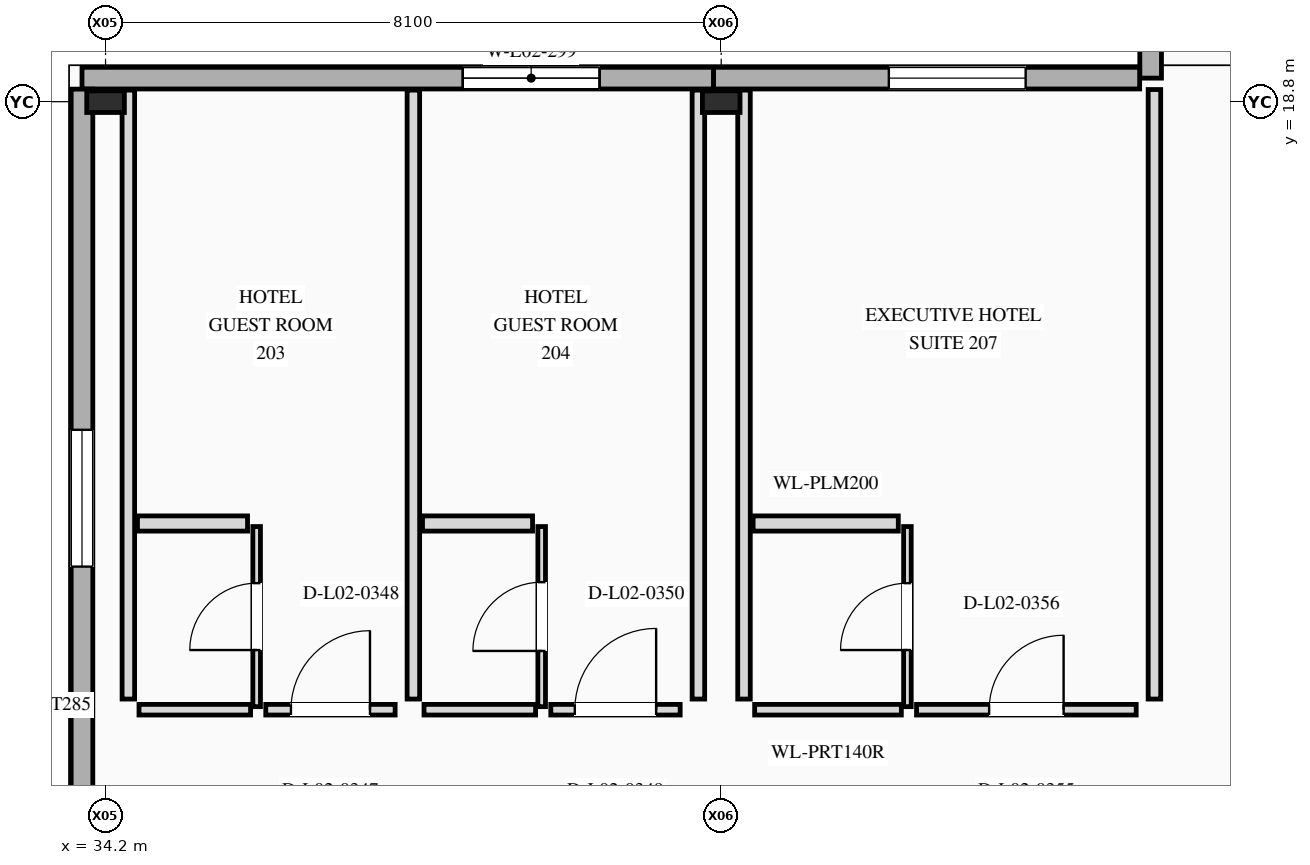
"""IFC4 building model, lengths in metres.
Left out: names, types, materials, properties, quantities, classifications, styles, units other than length and angle.
Written with IfcOpenShell. Run it as: python <this file> out.ifc"""

import sys

from ifc_helpers import new_model, si_unit, direction, frame, frame_2d, origin, origin_2d, place, context, subcontext, project, spatial, rectangle, i_section, extrude, element, fill, save


model = new_model("IFC4")
c1 = context("Model", 3, precision=1e-05, world=origin(), true_north=direction((0.0, 1.0)))
c2 = subcontext(c1, "Body", "Model", "MODEL_VIEW")
j1 = project(units=[si_unit("LENGTHUNIT", "METRE"), si_unit("PLANEANGLEUNIT", "RADIAN")], contexts=[c1])
p1 = place(None, origin())
s1 = spatial("IfcSite", under=j1, at=p1, CompositionType="ELEMENT")
p2 = place(p1, origin())
s2 = spatial("IfcBuilding", under=s1, at=p2, CompositionType="ELEMENT")
p3 = place(p2, frame((0.0, 0.0, 10.8)))
s3 = spatial("IfcBuildingStorey", under=s2, at=p3, CompositionType="ELEMENT", Elevation=10.8)
for number, where, z_axis, x_axis in (
    (1, (34.2, 18.8, 0.0), (0.0, 0.0, 1.0), (0.0, 1.0, 0.0)),
    (2, (42.3, 18.8, 0.0), (0.0, 0.0, 1.0), (0.0, 1.0, 0.0)),
):
    element("IfcColumn", number, at=place(p3, frame(where, z_axis=z_axis, x_axis=x_axis)), inside=s3, PredefinedType="COLUMN", context=c2, shape_type="SweptSolid", body=[
        extrude(i_section(OverallWidth=0.284, OverallDepth=0.495, WebThickness=0.019, FlangeThickness=0.033, at=origin_2d()), origin(), (0.0, 0.0, 1.0), 4.8),
    ])
p4 = place(p3, frame((47.95, 19.11, 0.0), z_axis=(0.0, 0.0, 1.0), x_axis=(0.0, 1.0, 0.0)))
e3 = element("IfcWall", 3, at=p4, inside=s3, PredefinedType="STANDARD", context=c2, shape_type="SweptSolid", body=[
    extrude(rectangle(XDim=5.38, YDim=0.285, at=frame_2d((2.69, 0.0))), origin(), (0.0, 0.0, 1.0), 4.8),
])
p5 = place(p4, frame((1.3, 0.0, 0.9)))
e4 = element("IfcOpeningElement", 4, at=p5, cuts=e3, PredefinedType="OPENING", context=c2, shape_type="SweptSolid", body=[
    extrude(rectangle(XDim=1.8, YDim=1.8, at=frame_2d((0.9, 0.9))), frame((0.0, 0.152, 0.0), z_axis=(0.0, -1.0, 0.0), x_axis=(1.0, 0.0, 0.0)), (0.0, 0.0, 1.0), 0.305),
])
p6 = place(p3, frame((42.2, 19.11, 0.0), z_axis=(0.0, 0.0, 1.0), x_axis=(-1.0, 0.0, 0.0)))
e5 = element("IfcWall", 5, at=p6, inside=s3, PredefinedType="STANDARD", context=c2, shape_type="SweptSolid", body=[
    extrude(rectangle(XDim=8.31, YDim=0.285, at=frame_2d((4.155, 0.0))), origin(), (0.0, 0.0, 1.0), 4.8),
])
p7 = place(p6, frame((1.5, 0.0, 0.88)))
e6 = element("IfcOpeningElement", 6, at=p7, cuts=e5, PredefinedType="OPENING", context=c2, shape_type="SweptSolid", body=[
    extrude(rectangle(XDim=1.8, YDim=1.8, at=frame_2d((0.9, 0.9))), frame((0.0, 0.152, 0.0), z_axis=(0.0, -1.0, 0.0), x_axis=(1.0, 0.0, 0.0)), (0.0, 0.0, 1.0), 0.305),
])
p8 = place(p3, frame((47.805, 19.11, 0.0), z_axis=(0.0, 0.0, 1.0), x_axis=(-1.0, 0.0, 0.0)))
e7 = element("IfcWall", 7, at=p8, inside=s3, PredefinedType="STANDARD", context=c2, shape_type="SweptSolid", body=[
    extrude(rectangle(XDim=5.605, YDim=0.285, at=frame_2d((2.803, 0.0))), origin(), (0.0, 0.0, 1.0), 4.8),
])
p9 = place(p8, frame((1.5, 0.0, 0.88)))
e8 = element("IfcOpeningElement", 8, at=p9, cuts=e7, PredefinedType="OPENING", context=c2, shape_type="SweptSolid", body=[
    extrude(rectangle(XDim=1.8, YDim=1.8, at=frame_2d((0.9, 0.9))), frame((0.0, 0.152, 0.0), z_axis=(0.0, -1.0, 0.0), x_axis=(1.0, 0.0, 0.0)), (0.0, 0.0, 1.0), 0.305),
])
p10 = place(p3, frame((33.89, 18.966, 0.0), z_axis=(0.0, 0.0, 1.0), x_axis=(0.0, -1.0, 0.0)))
e9 = element("IfcWall", 9, at=p10, inside=s3, PredefinedType="STANDARD", context=c2, shape_type="SweptSolid", body=[
    extrude(rectangle(XDim=10.766, YDim=0.285, at=frame_2d((5.383, 0.0))), origin(), (0.0, 0.0, 1.0), 4.8),
])
p11 = place(p10, frame((4.483, 0.0, 0.88)))
e10 = element("IfcOpeningElement", 10, at=p11, cuts=e9, PredefinedType="OPENING", context=c2, shape_type="SweptSolid", body=[
    extrude(rectangle(XDim=1.8, YDim=1.8, at=frame_2d((0.9, 0.9))), frame((0.0, 0.152, 0.0), z_axis=(0.0, -1.0, 0.0), x_axis=(1.0, 0.0, 0.0)), (0.0, 0.0, 1.0), 0.305),
])
p12 = place(p3, frame((34.64, 10.8, 0.0), z_axis=(0.0, 0.0, 1.0), x_axis=(1.0, 0.0, 0.0)))
e11 = element("IfcWall", 11, at=p12, inside=s3, PredefinedType="PARTITIONING", context=c2, shape_type="SweptSolid", body=[
    extrude(rectangle(XDim=1.468, YDim=0.14, at=frame_2d((0.734, 0.0))), origin(), (0.0, 0.0, 1.0), 4.475),
])
p13 = place(p3, frame((36.308, 10.8, 0.0), z_axis=(0.0, 0.0, 1.0), x_axis=(1.0, 0.0, 0.0)))
e12 = element("IfcWall", 12, at=p13, inside=s3, PredefinedType="PARTITIONING", context=c2, shape_type="SweptSolid", body=[
    extrude(rectangle(XDim=1.702, YDim=0.14, at=frame_2d((0.851, 0.0))), origin(), (0.0, 0.0, 1.0), 4.475),
])
p14 = place(p13, frame((0.331, 0.0, 0.0)))
e13 = element("IfcOpeningElement", 13, at=p14, cuts=e12, PredefinedType="OPENING", context=c2, shape_type="SweptSolid", body=[
    extrude(rectangle(XDim=1.04, YDim=2.25, at=frame_2d((0.52, 1.125))), frame((0.0, 0.08, 0.0), z_axis=(0.0, -1.0, 0.0), x_axis=(1.0, 0.0, 0.0)), (0.0, 0.0, 1.0), 0.16),
])
p15 = place(p3, frame((34.5, 10.94, 0.0), z_axis=(0.0, 0.0, 1.0), x_axis=(0.0, 1.0, 0.0)))
e14 = element("IfcWall", 14, at=p15, inside=s3, PredefinedType="PARTITIONING", context=c2, shape_type="SweptSolid", body=[
    extrude(rectangle(XDim=8.012, YDim=0.165, at=frame_2d((4.006, 0.0))), origin(), (0.0, 0.0, 1.0), 3.804),
])
p16 = place(p3, frame((38.25, 10.94, 0.0), z_axis=(0.0, 0.0, 1.0), x_axis=(0.0, 1.0, 0.0)))
e15 = element("IfcWall", 15, at=p16, inside=s3, PredefinedType="PARTITIONING", context=c2, shape_type="SweptSolid", body=[
    extrude(rectangle(XDim=8.012, YDim=0.165, at=frame_2d((4.006, 0.0))), origin(), (0.0, 0.0, 1.0), 3.888),
])
p17 = place(p3, frame((36.188, 10.84, 0.0), z_axis=(0.0, 0.0, 1.0), x_axis=(0.0, 1.0, 0.0)))
e16 = element("IfcWall", 16, at=p17, inside=s3, PredefinedType="PARTITIONING", context=c2, shape_type="SweptSolid", body=[
    extrude(rectangle(XDim=2.37, YDim=0.1, at=frame_2d((1.185, 0.0))), origin(), (0.0, 0.0, 1.0), 4.144),
])
p18 = place(p17, frame((0.745, 0.0, 0.0)))
e17 = element("IfcOpeningElement", 17, at=p18, cuts=e16, PredefinedType="OPENING", context=c2, shape_type="SweptSolid", body=[
    extrude(rectangle(XDim=0.88, YDim=2.18, at=frame_2d((0.44, 1.09))), frame((0.0, 0.06, 0.0), z_axis=(0.0, -1.0, 0.0), x_axis=(1.0, 0.0, 0.0)), (0.0, 0.0, 1.0), 0.12),
])
p19 = place(p3, frame((34.62, 13.25, 0.0), z_axis=(0.0, 0.0, 1.0), x_axis=(1.0, 0.0, 0.0)))
e18 = element("IfcWall", 18, at=p19, inside=s3, PredefinedType="PLUMBINGWALL", context=c2, shape_type="SweptSolid", body=[
    extrude(rectangle(XDim=1.448, YDim=0.2, at=frame_2d((0.724, 0.0))), origin(), (0.0, 0.0, 1.0), 4.475),
])
p20 = place(p3, frame((38.39, 10.8, 0.0), z_axis=(0.0, 0.0, 1.0), x_axis=(1.0, 0.0, 0.0)))
e19 = element("IfcWall", 19, at=p20, inside=s3, PredefinedType="PARTITIONING", context=c2, shape_type="SweptSolid", body=[
    extrude(rectangle(XDim=1.468, YDim=0.14, at=frame_2d((0.734, 0.0))), origin(), (0.0, 0.0, 1.0), 4.475),
])
p21 = place(p3, frame((40.058, 10.8, 0.0), z_axis=(0.0, 0.0, 1.0), x_axis=(1.0, 0.0, 0.0)))
e20 = element("IfcWall", 20, at=p21, inside=s3, PredefinedType="PARTITIONING", context=c2, shape_type="SweptSolid", body=[
    extrude(rectangle(XDim=1.702, YDim=0.14, at=frame_2d((0.851, 0.0))), origin(), (0.0, 0.0, 1.0), 4.475),
])
p22 = place(p21, frame((0.316, 0.0, 0.0)))
e21 = element("IfcOpeningElement", 21, at=p22, cuts=e20, PredefinedType="OPENING", context=c2, shape_type="SweptSolid", body=[
    extrude(rectangle(XDim=1.07, YDim=2.25, at=frame_2d((0.535, 1.125))), frame((0.0, 0.08, 0.0), z_axis=(0.0, -1.0, 0.0), x_axis=(1.0, 0.0, 0.0)), (0.0, 0.0, 1.0), 0.16),
])
p23 = place(p3, frame((42.0, 10.94, 0.0), z_axis=(0.0, 0.0, 1.0), x_axis=(0.0, 1.0, 0.0)))
e22 = element("IfcWall", 22, at=p23, inside=s3, PredefinedType="PARTITIONING", context=c2, shape_type="SweptSolid", body=[
    extrude(rectangle(XDim=8.012, YDim=0.165, at=frame_2d((4.006, 0.0))), origin(), (0.0, 0.0, 1.0), 3.804),
])
p24 = place(p3, frame((39.938, 10.84, 0.0), z_axis=(0.0, 0.0, 1.0), x_axis=(0.0, 1.0, 0.0)))
e23 = element("IfcWall", 23, at=p24, inside=s3, PredefinedType="PARTITIONING", context=c2, shape_type="SweptSolid", body=[
    extrude(rectangle(XDim=2.37, YDim=0.1, at=frame_2d((1.185, 0.0))), origin(), (0.0, 0.0, 1.0), 4.144),
])
p25 = place(p24, frame((0.733, 0.0, 0.0)))
e24 = element("IfcOpeningElement", 24, at=p25, cuts=e23, PredefinedType="OPENING", context=c2, shape_type="SweptSolid", body=[
    extrude(rectangle(XDim=0.905, YDim=2.18, at=frame_2d((0.453, 1.09))), frame((0.0, 0.06, 0.0), z_axis=(0.0, -1.0, 0.0), x_axis=(1.0, 0.0, 0.0)), (0.0, 0.0, 1.0), 0.12),
])
p26 = place(p3, frame((38.37, 13.25, 0.0), z_axis=(0.0, 0.0, 1.0), x_axis=(1.0, 0.0, 0.0)))
e25 = element("IfcWall", 25, at=p26, inside=s3, PredefinedType="PLUMBINGWALL", context=c2, shape_type="SweptSolid", body=[
    extrude(rectangle(XDim=1.448, YDim=0.2, at=frame_2d((0.724, 0.0))), origin(), (0.0, 0.0, 1.0), 4.475),
])
p27 = place(p3, frame((42.74, 10.8, 0.0), z_axis=(0.0, 0.0, 1.0), x_axis=(1.0, 0.0, 0.0)))
e26 = element("IfcWall", 26, at=p27, inside=s3, PredefinedType="PARTITIONING", context=c2, shape_type="SweptSolid", body=[
    extrude(rectangle(XDim=1.93, YDim=0.14, at=frame_2d((0.965, 0.0))), origin(), (0.0, 0.0, 1.0), 4.475),
])
p28 = place(p3, frame((44.87, 10.8, 0.0), z_axis=(0.0, 0.0, 1.0), x_axis=(1.0, 0.0, 0.0)))
e27 = element("IfcWall", 27, at=p28, inside=s3, PredefinedType="PARTITIONING", context=c2, shape_type="SweptSolid", body=[
    extrude(rectangle(XDim=2.89, YDim=0.14, at=frame_2d((1.445, 0.0))), origin(), (0.0, 0.0, 1.0), 4.475),
])
p29 = place(p28, frame((0.955, 0.0, 0.0)))
e28 = element("IfcOpeningElement", 28, at=p29, cuts=e27, PredefinedType="OPENING", context=c2, shape_type="SweptSolid", body=[
    extrude(rectangle(XDim=0.98, YDim=2.35, at=frame_2d((0.49, 1.175))), frame((0.0, 0.08, 0.0), z_axis=(0.0, -1.0, 0.0), x_axis=(1.0, 0.0, 0.0)), (0.0, 0.0, 1.0), 0.16),
])
p30 = place(p3, frame((42.6, 10.94, 0.0), z_axis=(0.0, 0.0, 1.0), x_axis=(0.0, 1.0, 0.0)))
e29 = element("IfcWall", 29, at=p30, inside=s3, PredefinedType="PARTITIONING", context=c2, shape_type="SweptSolid", body=[
    extrude(rectangle(XDim=8.012, YDim=0.165, at=frame_2d((4.006, 0.0))), origin(), (0.0, 0.0, 1.0), 3.804),
])
p31 = place(p3, frame((48.0, 10.94, 0.0), z_axis=(0.0, 0.0, 1.0), x_axis=(0.0, 1.0, 0.0)))
e30 = element("IfcWall", 30, at=p31, inside=s3, PredefinedType="PARTITIONING", context=c2, shape_type="SweptSolid", body=[
    extrude(rectangle(XDim=8.02, YDim=0.165, at=frame_2d((4.01, 0.0))), origin(), (0.0, 0.0, 1.0), 4.475),
])
p32 = place(p3, frame((44.75, 10.84, 0.0), z_axis=(0.0, 0.0, 1.0), x_axis=(0.0, 1.0, 0.0)))
e31 = element("IfcWall", 31, at=p32, inside=s3, PredefinedType="PARTITIONING", context=c2, shape_type="SweptSolid", body=[
    extrude(rectangle(XDim=2.37, YDim=0.1, at=frame_2d((1.185, 0.0))), origin(), (0.0, 0.0, 1.0), 4.475),
])
p33 = place(p32, frame((0.745, 0.0, 0.0)))
e32 = element("IfcOpeningElement", 32, at=p33, cuts=e31, PredefinedType="OPENING", context=c2, shape_type="SweptSolid", body=[
    extrude(rectangle(XDim=0.88, YDim=2.1, at=frame_2d((0.44, 1.05))), frame((0.0, 0.06, 0.0), z_axis=(0.0, -1.0, 0.0), x_axis=(1.0, 0.0, 0.0)), (0.0, 0.0, 1.0), 0.12),
])
p34 = place(p3, frame((42.72, 13.25, 0.0), z_axis=(0.0, 0.0, 1.0), x_axis=(1.0, 0.0, 0.0)))
e33 = element("IfcWall", 33, at=p34, inside=s3, PredefinedType="PLUMBINGWALL", context=c2, shape_type="SweptSolid", body=[
    extrude(rectangle(XDim=1.91, YDim=0.2, at=frame_2d((0.955, 0.0))), origin(), (0.0, 0.0, 1.0), 4.475),
])
p35 = place(p7, origin())
e34 = element("IfcWindow", 34, at=p35, inside=s3, PartitioningType="SINGLE_PANEL", PredefinedType="WINDOW", context=c2, shape_type="SweptSolid", body=[
    extrude(rectangle(XDim=1.8, YDim=1.8, at=frame_2d((0.9, 0.9))), frame((0.0, 0.03, 0.0), z_axis=(0.0, -1.0, 0.0), x_axis=(1.0, 0.0, 0.0)), (0.0, 0.0, 1.0), 0.06),
])
fill(e6, e34)
p36 = place(p9, origin())
e35 = element("IfcWindow", 35, at=p36, inside=s3, PartitioningType="SINGLE_PANEL", PredefinedType="WINDOW", context=c2, shape_type="SweptSolid", body=[
    extrude(rectangle(XDim=1.8, YDim=1.8, at=frame_2d((0.9, 0.9))), frame((0.0, 0.03, 0.0), z_axis=(0.0, -1.0, 0.0), x_axis=(1.0, 0.0, 0.0)), (0.0, 0.0, 1.0), 0.06),
])
fill(e8, e35)
p37 = place(p11, origin())
e36 = element("IfcWindow", 36, at=p37, inside=s3, PartitioningType="SINGLE_PANEL", PredefinedType="WINDOW", context=c2, shape_type="SweptSolid", body=[
    extrude(rectangle(XDim=1.8, YDim=1.8, at=frame_2d((0.9, 0.9))), frame((0.0, 0.03, 0.0), z_axis=(0.0, -1.0, 0.0), x_axis=(1.0, 0.0, 0.0)), (0.0, 0.0, 1.0), 0.06),
])
fill(e10, e36)
p38 = place(p14, origin())
e37 = element("IfcDoor", 37, at=p38, inside=s3, OperationType="SINGLE_SWING_RIGHT", PredefinedType="DOOR", context=c2, shape_type="SweptSolid", body=[
    extrude(rectangle(XDim=1.04, YDim=2.25, at=frame_2d((0.52, 1.125))), frame((0.0, 0.025, 0.0), z_axis=(0.0, -1.0, 0.0), x_axis=(1.0, 0.0, 0.0)), (0.0, 0.0, 1.0), 0.05),
])
fill(e13, e37)
p39 = place(p18, origin())
e38 = element("IfcDoor", 38, at=p39, inside=s3, OperationType="SINGLE_SWING_LEFT", PredefinedType="DOOR", context=c2, shape_type="SweptSolid", body=[
    extrude(rectangle(XDim=0.88, YDim=2.18, at=frame_2d((0.44, 1.09))), frame((0.0, 0.025, 0.0), z_axis=(0.0, -1.0, 0.0), x_axis=(1.0, 0.0, 0.0)), (0.0, 0.0, 1.0), 0.05),
])
fill(e17, e38)
p40 = place(p22, origin())
e39 = element("IfcDoor", 39, at=p40, inside=s3, OperationType="SINGLE_SWING_RIGHT", PredefinedType="DOOR", context=c2, shape_type="SweptSolid", body=[
    extrude(rectangle(XDim=1.07, YDim=2.25, at=frame_2d((0.535, 1.125))), frame((0.0, 0.025, 0.0), z_axis=(0.0, -1.0, 0.0), x_axis=(1.0, 0.0, 0.0)), (0.0, 0.0, 1.0), 0.05),
])
fill(e21, e39)
p41 = place(p25, origin())
e40 = element("IfcDoor", 40, at=p41, inside=s3, OperationType="SINGLE_SWING_LEFT", PredefinedType="DOOR", context=c2, shape_type="SweptSolid", body=[
    extrude(rectangle(XDim=0.905, YDim=2.18, at=frame_2d((0.453, 1.09))), frame((0.0, 0.025, 0.0), z_axis=(0.0, -1.0, 0.0), x_axis=(1.0, 0.0, 0.0)), (0.0, 0.0, 1.0), 0.05),
])
fill(e24, e40)
p42 = place(p29, origin())
e41 = element("IfcDoor", 41, at=p42, inside=s3, OperationType="SINGLE_SWING_RIGHT", PredefinedType="DOOR", context=c2, shape_type="SweptSolid", body=[
    extrude(rectangle(XDim=0.98, YDim=2.35, at=frame_2d((0.49, 1.175))), frame((0.0, 0.025, 0.0), z_axis=(0.0, -1.0, 0.0), x_axis=(1.0, 0.0, 0.0)), (0.0, 0.0, 1.0), 0.05),
])
fill(e28, e41)
p43 = place(p33, origin())
e42 = element("IfcDoor", 42, at=p43, inside=s3, OperationType="SINGLE_SWING_LEFT", PredefinedType="DOOR", context=c2, shape_type="SweptSolid", body=[
    extrude(rectangle(XDim=0.88, YDim=2.1, at=frame_2d((0.44, 1.05))), frame((0.0, 0.025, 0.0), z_axis=(0.0, -1.0, 0.0), x_axis=(1.0, 0.0, 0.0)), (0.0, 0.0, 1.0), 0.05),
])
fill(e32, e42)
save(model, sys.argv[1])
